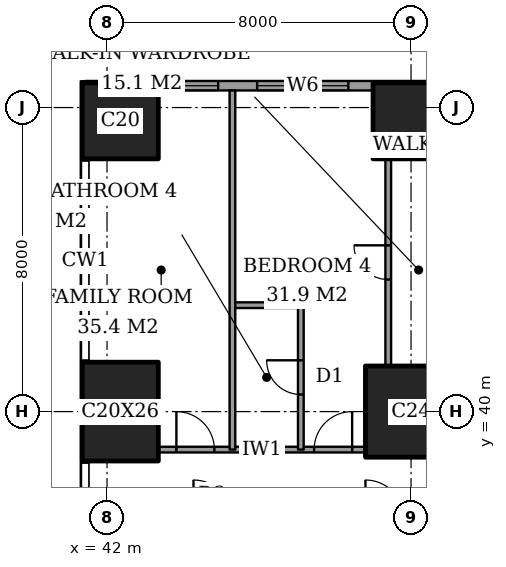
"""IFC4 building model, lengths in metres.
Left out: names, types, materials, properties, quantities, classifications, styles, units other than length and angle.
Written with IfcOpenShell. Run it as: python <this file> out.ifc"""

import sys

from ifc_helpers import new_model, si_unit, direction, frame, frame_2d, origin, origin_2d, place, context, subcontext, project, spatial, rectangle, extrude, element, fill, save


model = new_model("IFC4")
c1 = context("Model", 3, precision=1e-05, world=origin(), true_north=direction((0.0, 1.0)))
c2 = subcontext(c1, "Body", "Model", "MODEL_VIEW")
j1 = project(units=[si_unit("LENGTHUNIT", "METRE"), si_unit("PLANEANGLEUNIT", "RADIAN")], contexts=[c1])
p1 = place(None, origin())
s1 = spatial("IfcSite", under=j1, at=p1, CompositionType="ELEMENT")
p2 = place(p1, origin())
s2 = spatial("IfcBuilding", under=s1, at=p2, CompositionType="ELEMENT")
p3 = place(p2, frame((0.0, 0.0, 65.6)))
s3 = spatial("IfcBuildingStorey", under=s2, at=p3, CompositionType="ELEMENT", Elevation=65.6)
p4 = place(p3, frame((42.35, 40.0, 0.0), z_axis=(0.0, 0.0, 1.0), x_axis=(1.0, 0.0, 0.0)))
e1 = element("IfcColumn", 1, at=p4, inside=s3, PredefinedType="COLUMN", context=c2, shape_type="SweptSolid", body=[
    extrude(rectangle(XDim=2.0, YDim=2.6, at=origin_2d()), origin(), (0.0, 0.0, 1.0), 3.6),
])
p5 = place(p3, frame((42.35, 47.65, 0.0), z_axis=(0.0, 0.0, 1.0), x_axis=(1.0, 0.0, 0.0)))
e2 = element("IfcColumn", 2, at=p5, inside=s3, PredefinedType="COLUMN", context=c2, shape_type="SweptSolid", body=[
    extrude(rectangle(XDim=2.0, YDim=2.0, at=origin_2d()), origin(), (0.0, 0.0, 1.0), 3.6),
])
p6 = place(p3, frame((50.0, 40.0, 0.0), z_axis=(0.0, 0.0, 1.0), x_axis=(1.0, 0.0, 0.0)))
e3 = element("IfcColumn", 3, at=p6, inside=s3, PredefinedType="COLUMN", context=c2, shape_type="SweptSolid", body=[
    extrude(rectangle(XDim=2.4, YDim=2.4, at=origin_2d()), origin(), (0.0, 0.0, 1.0), 3.6),
])
p7 = place(p3, frame((50.0, 47.65, 0.0), z_axis=(0.0, 0.0, 1.0), x_axis=(1.0, 0.0, 0.0)))
e4 = element("IfcColumn", 4, at=p7, inside=s3, PredefinedType="COLUMN", context=c2, shape_type="SweptSolid", body=[
    extrude(rectangle(XDim=2.0, YDim=2.0, at=origin_2d()), origin(), (0.0, 0.0, 1.0), 3.6),
])
p8 = place(p3, frame((62.825, 48.575, 0.0), z_axis=(0.0, 0.0, 1.0), x_axis=(-1.0, 0.0, 0.0)))
e5 = element("IfcWall", 5, at=p8, inside=s3, PredefinedType="SOLIDWALL", context=c2, shape_type="SweptSolid", body=[
    extrude(rectangle(XDim=21.4, YDim=0.25, at=frame_2d((10.7, 0.0))), origin(), (0.0, 0.0, 1.0), 3.6),
])
p9 = place(p8, frame((1.0, 0.0, 0.6)))
e6 = element("IfcOpeningElement", 6, at=p9, cuts=e5, PredefinedType="OPENING", context=c2, shape_type="SweptSolid", body=[
    extrude(rectangle(XDim=1.2, YDim=2.0, at=frame_2d((0.6, 1.0))), frame((0.0, 0.135, 0.0), z_axis=(0.0, -1.0, 0.0), x_axis=(1.0, 0.0, 0.0)), (0.0, 0.0, 1.0), 0.27),
])
p10 = place(p8, frame((6.775, 0.0, 0.6)))
e7 = element("IfcOpeningElement", 7, at=p10, cuts=e5, PredefinedType="OPENING", context=c2, shape_type="SweptSolid", body=[
    extrude(rectangle(XDim=2.4, YDim=2.0, at=frame_2d((1.2, 1.0))), frame((0.0, 0.135, 0.0), z_axis=(0.0, -1.0, 0.0), x_axis=(1.0, 0.0, 0.0)), (0.0, 0.0, 1.0), 0.27),
])
p11 = place(p8, frame((10.45, 0.0, 0.6)))
e8 = element("IfcOpeningElement", 8, at=p11, cuts=e5, PredefinedType="OPENING", context=c2, shape_type="SweptSolid", body=[
    extrude(rectangle(XDim=1.2, YDim=2.0, at=frame_2d((0.6, 1.0))), frame((0.0, 0.135, 0.0), z_axis=(0.0, -1.0, 0.0), x_axis=(1.0, 0.0, 0.0)), (0.0, 0.0, 1.0), 0.27),
])
p12 = place(p8, frame((14.475, 0.0, 0.6)))
e9 = element("IfcOpeningElement", 9, at=p12, cuts=e5, PredefinedType="OPENING", context=c2, shape_type="SweptSolid", body=[
    extrude(rectangle(XDim=2.4, YDim=2.0, at=frame_2d((1.2, 1.0))), frame((0.0, 0.135, 0.0), z_axis=(0.0, -1.0, 0.0), x_axis=(1.0, 0.0, 0.0)), (0.0, 0.0, 1.0), 0.27),
])
p13 = place(p8, frame((17.9, 0.0, 0.6)))
e10 = element("IfcOpeningElement", 10, at=p13, cuts=e5, PredefinedType="OPENING", context=c2, shape_type="SweptSolid", body=[
    extrude(rectangle(XDim=1.2, YDim=2.0, at=frame_2d((0.6, 1.0))), frame((0.0, 0.135, 0.0), z_axis=(0.0, -1.0, 0.0), x_axis=(1.0, 0.0, 0.0)), (0.0, 0.0, 1.0), 0.27),
])
p14 = place(p3, frame((43.35, 39.0, 0.0), z_axis=(0.0, 0.0, 1.0), x_axis=(1.0, 0.0, 0.0)))
e11 = element("IfcWall", 11, at=p14, inside=s3, PredefinedType="PARTITIONING", context=c2, shape_type="SweptSolid", body=[
    extrude(rectangle(XDim=5.45, YDim=0.15, at=frame_2d((2.725, 0.0))), origin(), (0.0, 0.0, 1.0), 3.35),
])
p15 = place(p14, frame((4.1, 0.0, 0.0)))
e12 = element("IfcOpeningElement", 12, at=p15, cuts=e11, PredefinedType="OPENING", context=c2, shape_type="SweptSolid", body=[
    extrude(rectangle(XDim=1.0, YDim=2.1, at=frame_2d((0.5, 1.05))), frame((0.0, 0.085, 0.0), z_axis=(0.0, -1.0, 0.0), x_axis=(1.0, 0.0, 0.0)), (0.0, 0.0, 1.0), 0.17),
])
p16 = place(p14, frame((0.475, 0.0, 0.0)))
e13 = element("IfcOpeningElement", 13, at=p16, cuts=e11, PredefinedType="OPENING", context=c2, shape_type="SweptSolid", body=[
    extrude(rectangle(XDim=1.0, YDim=2.1, at=frame_2d((0.5, 1.05))), frame((0.0, 0.085, 0.0), z_axis=(0.0, -1.0, 0.0), x_axis=(1.0, 0.0, 0.0)), (0.0, 0.0, 1.0), 0.17),
])
p17 = place(p3, frame((45.3, 42.8, 0.0), z_axis=(0.0, 0.0, 1.0), x_axis=(1.0, 0.0, 0.0)))
e14 = element("IfcWall", 14, at=p17, inside=s3, PredefinedType="PARTITIONING", context=c2, shape_type="SweptSolid", body=[
    extrude(rectangle(XDim=1.8, YDim=0.15, at=frame_2d((0.9, 0.0))), origin(), (0.0, 0.0, 1.0), 3.35),
])
p18 = place(p3, frame((45.3, 39.0, 0.0), z_axis=(0.0, 0.0, 1.0), x_axis=(0.0, 1.0, 0.0)))
e15 = element("IfcWall", 15, at=p18, inside=s3, PredefinedType="PARTITIONING", context=c2, shape_type="SweptSolid", body=[
    extrude(rectangle(XDim=9.45, YDim=0.15, at=frame_2d((4.725, 0.0))), origin(), (0.0, 0.0, 1.0), 3.35),
])
p19 = place(p3, frame((47.1, 39.0, 0.0), z_axis=(0.0, 0.0, 1.0), x_axis=(0.0, 1.0, 0.0)))
e16 = element("IfcWall", 16, at=p19, inside=s3, PredefinedType="PARTITIONING", context=c2, shape_type="SweptSolid", body=[
    extrude(rectangle(XDim=3.8, YDim=0.15, at=frame_2d((1.9, 0.0))), origin(), (0.0, 0.0, 1.0), 3.35),
])
p20 = place(p19, frame((1.45, 0.0, 0.0)))
e17 = element("IfcOpeningElement", 17, at=p20, cuts=e16, PredefinedType="OPENING", context=c2, shape_type="SweptSolid", body=[
    extrude(rectangle(XDim=0.9, YDim=2.1, at=frame_2d((0.45, 1.05))), frame((0.0, 0.085, 0.0), z_axis=(0.0, -1.0, 0.0), x_axis=(1.0, 0.0, 0.0)), (0.0, 0.0, 1.0), 0.17),
])
p21 = place(p3, frame((49.4, 41.2, 0.0), z_axis=(0.0, 0.0, 1.0), x_axis=(0.0, 1.0, 0.0)))
e18 = element("IfcWall", 18, at=p21, inside=s3, PredefinedType="PARTITIONING", context=c2, shape_type="SweptSolid", body=[
    extrude(rectangle(XDim=5.45, YDim=0.15, at=frame_2d((2.725, 0.0))), origin(), (0.0, 0.0, 1.0), 3.35),
])
p22 = place(p21, frame((2.275, 0.0, 0.0)))
e19 = element("IfcOpeningElement", 19, at=p22, cuts=e18, PredefinedType="OPENING", context=c2, shape_type="SweptSolid", body=[
    extrude(rectangle(XDim=0.9, YDim=2.1, at=frame_2d((0.45, 1.05))), frame((0.0, 0.085, 0.0), z_axis=(0.0, -1.0, 0.0), x_axis=(1.0, 0.0, 0.0)), (0.0, 0.0, 1.0), 0.17),
])
p23 = place(p12, origin())
e20 = element("IfcWindow", 20, at=p23, inside=s3, PartitioningType="SINGLE_PANEL", PredefinedType="WINDOW", context=c2, shape_type="SweptSolid", body=[
    extrude(rectangle(XDim=2.4, YDim=2.0, at=frame_2d((1.2, 1.0))), frame((0.0, 0.03, 0.0), z_axis=(0.0, -1.0, 0.0), x_axis=(1.0, 0.0, 0.0)), (0.0, 0.0, 1.0), 0.06),
])
fill(e9, e20)
p24 = place(p13, origin())
e21 = element("IfcWindow", 21, at=p24, inside=s3, PartitioningType="SINGLE_PANEL", PredefinedType="WINDOW", context=c2, shape_type="SweptSolid", body=[
    extrude(rectangle(XDim=1.2, YDim=2.0, at=frame_2d((0.6, 1.0))), frame((0.0, 0.03, 0.0), z_axis=(0.0, -1.0, 0.0), x_axis=(1.0, 0.0, 0.0)), (0.0, 0.0, 1.0), 0.06),
])
fill(e10, e21)
p25 = place(p22, origin())
e22 = element("IfcDoor", 22, at=p25, inside=s3, OperationType="SINGLE_SWING_LEFT", PredefinedType="DOOR", context=c2, shape_type="SweptSolid", body=[
    extrude(rectangle(XDim=0.9, YDim=2.1, at=frame_2d((0.45, 1.05))), frame((0.0, 0.025, 0.0), z_axis=(0.0, -1.0, 0.0), x_axis=(1.0, 0.0, 0.0)), (0.0, 0.0, 1.0), 0.05),
])
fill(e19, e22)
p26 = place(p20, origin())
e23 = element("IfcDoor", 23, at=p26, inside=s3, OperationType="SINGLE_SWING_LEFT", PredefinedType="DOOR", context=c2, shape_type="SweptSolid", body=[
    extrude(rectangle(XDim=0.9, YDim=2.1, at=frame_2d((0.45, 1.05))), frame((0.0, 0.025, 0.0), z_axis=(0.0, -1.0, 0.0), x_axis=(1.0, 0.0, 0.0)), (0.0, 0.0, 1.0), 0.05),
])
fill(e17, e23)
p27 = place(p15, origin())
e24 = element("IfcDoor", 24, at=p27, inside=s3, OperationType="SINGLE_SWING_LEFT", PredefinedType="DOOR", context=c2, shape_type="SweptSolid", body=[
    extrude(rectangle(XDim=1.0, YDim=2.1, at=frame_2d((0.5, 1.05))), frame((0.0, 0.025, 0.0), z_axis=(0.0, -1.0, 0.0), x_axis=(1.0, 0.0, 0.0)), (0.0, 0.0, 1.0), 0.05),
])
fill(e12, e24)
p28 = place(p16, origin())
e25 = element("IfcDoor", 25, at=p28, inside=s3, OperationType="SINGLE_SWING_RIGHT", PredefinedType="DOOR", context=c2, shape_type="SweptSolid", body=[
    extrude(rectangle(XDim=1.0, YDim=2.1, at=frame_2d((0.5, 1.05))), frame((0.0, 0.025, 0.0), z_axis=(0.0, -1.0, 0.0), x_axis=(1.0, 0.0, 0.0)), (0.0, 0.0, 1.0), 0.05),
])
fill(e13, e25)
save(model, sys.argv[1])
